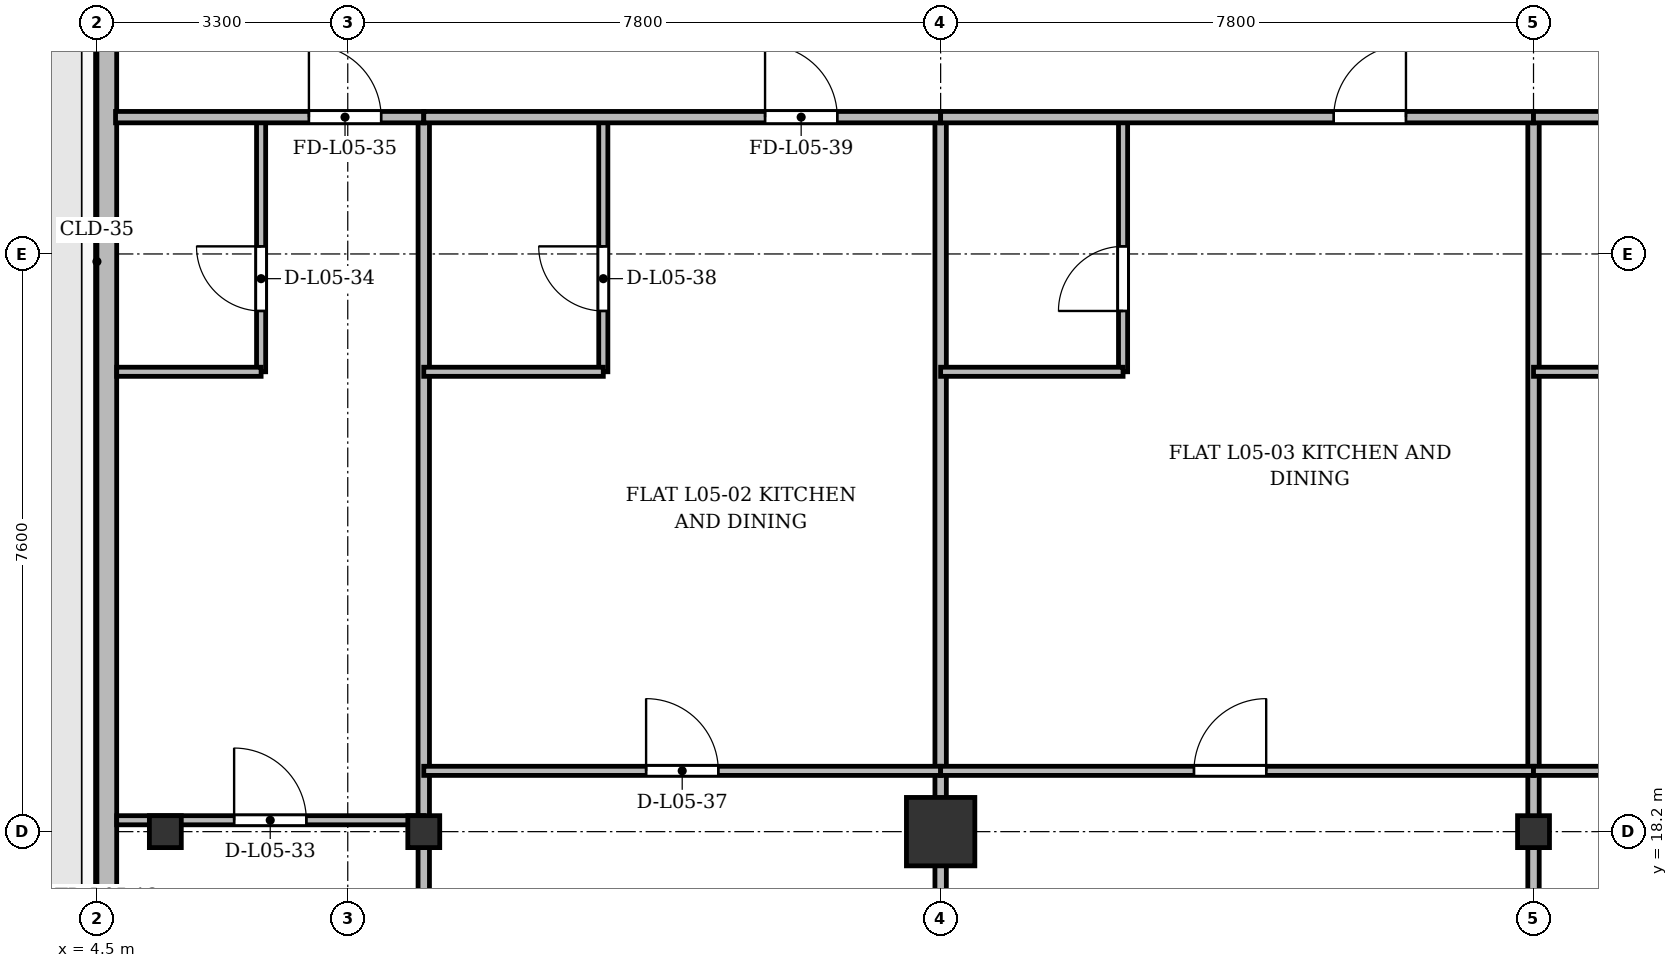
"""IFC4 building model, lengths in metres.
Left out: names, types, materials, properties, quantities, classifications, styles, units other than length and angle.
Written with IfcOpenShell. Run it as: python <this file> out.ifc"""

import sys

from ifc_helpers import new_model, si_unit, direction, frame, frame_2d, origin, origin_2d, place, context, subcontext, project, spatial, rectangle, i_section, extrude, source, transform, mapped, element, fill, save


model = new_model("IFC4")
c1 = context("Model", 3, precision=1e-05, world=origin(), true_north=direction((0.0, 1.0)))
c2 = subcontext(c1, "Body", "Model", "MODEL_VIEW")
j1 = project(units=[si_unit("LENGTHUNIT", "METRE"), si_unit("PLANEANGLEUNIT", "RADIAN")], contexts=[c1])
p1 = place(None, origin())
s1 = spatial("IfcSite", under=j1, at=p1, CompositionType="ELEMENT")
p2 = place(p1, origin())
s2 = spatial("IfcBuilding", under=s1, at=p2, CompositionType="ELEMENT")
p3 = place(p2, frame((0.0, 0.0, 23.5)))
s3 = spatial("IfcBuildingStorey", under=s2, at=p3, CompositionType="ELEMENT", Elevation=23.5)
m1 = source(origin(), c2, "Body", "SweptSolid", [
    extrude(i_section(OverallWidth=0.42, OverallDepth=0.42, WebThickness=0.026, FlangeThickness=0.04, at=origin_2d()), origin(), (0.0, 0.0, 1.0), 3.6),
])
for number, where, z_axis, x_axis in (
    (1, (5.4, 18.2, 0.0), (0.0, 0.0, 1.0), (1.0, 0.0, 0.0)),
    (2, (8.8, 18.2, 0.0), (0.0, 0.0, 1.0), (1.0, 0.0, 0.0)),
):
    element("IfcColumn", number, at=place(p3, frame(where, z_axis=z_axis, x_axis=x_axis)), inside=s3, PredefinedType="COLUMN", context=c2, shape_type="MappedRepresentation", body=[
        mapped(m1, transform((0.0, 0.0, 0.0), x_axis=(1.0, 0.0, 0.0), y_axis=(0.0, 1.0, 0.0), z_axis=(0.0, 0.0, 1.0), scale=1.0)),
    ])
m2 = source(origin(), c2, "Body", "SweptSolid", [
    extrude(rectangle(XDim=0.9, YDim=0.9, at=origin_2d()), origin(), (0.0, 0.0, 1.0), 3.6),
])
p4 = place(p3, frame((15.6, 18.2, 0.0), z_axis=(0.0, 0.0, 1.0), x_axis=(1.0, 0.0, 0.0)))
e3 = element("IfcColumn", 3, at=p4, inside=s3, PredefinedType="COLUMN", context=c2, shape_type="MappedRepresentation", body=[
    mapped(m2, transform((0.0, 0.0, 0.0), x_axis=(1.0, 0.0, 0.0), y_axis=(0.0, 1.0, 0.0), z_axis=(0.0, 0.0, 1.0), scale=1.0)),
])
p5 = place(p3, frame((23.4, 18.2, 0.0), z_axis=(0.0, 0.0, 1.0), x_axis=(1.0, 0.0, 0.0)))
e4 = element("IfcColumn", 4, at=p5, inside=s3, PredefinedType="COLUMN", context=c2, shape_type="MappedRepresentation", body=[
    mapped(m1, transform((0.0, 0.0, 0.0), x_axis=(1.0, 0.0, 0.0), y_axis=(0.0, 1.0, 0.0), z_axis=(0.0, 0.0, 1.0), scale=1.0)),
])
p6 = place(p3, frame((4.63, 5.9, 0.0), z_axis=(0.0, 0.0, 1.0), x_axis=(0.0, 1.0, 0.0)))
e5 = element("IfcWall", 5, at=p6, inside=s3, PredefinedType="SOLIDWALL", context=c2, shape_type="SweptSolid", body=[
    extrude(rectangle(XDim=39.6, YDim=0.26, at=frame_2d((19.8, 0.0))), origin(), (0.0, 0.0, 1.0), 3.34),
])
p7 = place(p6, frame((9.745, 0.0, 0.0)))
e6 = element("IfcOpeningElement", 6, at=p7, cuts=e5, PredefinedType="OPENING", context=c2, shape_type="SweptSolid", body=[
    extrude(rectangle(XDim=1.2, YDim=2.2, at=frame_2d((0.6, 1.1))), frame((0.0, 0.14, 0.0), z_axis=(0.0, -1.0, 0.0), x_axis=(1.0, 0.0, 0.0)), (0.0, 0.0, 1.0), 0.28),
])
p8 = place(p6, frame((1.45, 0.0, 0.92)))
e7 = element("IfcOpeningElement", 7, at=p8, cuts=e5, PredefinedType="OPENING", context=c2, shape_type="SweptSolid", body=[
    extrude(rectangle(XDim=1.2, YDim=1.65, at=frame_2d((0.6, 0.825))), frame((0.0, 0.14, 0.0), z_axis=(0.0, -1.0, 0.0), x_axis=(1.0, 0.0, 0.0)), (0.0, 0.0, 1.0), 0.28),
])
p9 = place(p6, frame((4.3, 0.0, 0.92)))
e8 = element("IfcOpeningElement", 8, at=p9, cuts=e5, PredefinedType="OPENING", context=c2, shape_type="SweptSolid", body=[
    extrude(rectangle(XDim=2.4, YDim=2.1, at=frame_2d((1.2, 1.05))), frame((0.0, 0.14, 0.0), z_axis=(0.0, -1.0, 0.0), x_axis=(1.0, 0.0, 0.0)), (0.0, 0.0, 1.0), 0.28),
])
p10 = place(p6, frame((33.9, 0.0, 0.92)))
e9 = element("IfcOpeningElement", 9, at=p10, cuts=e5, PredefinedType="OPENING", context=c2, shape_type="SweptSolid", body=[
    extrude(rectangle(XDim=1.2, YDim=1.65, at=frame_2d((0.6, 0.825))), frame((0.0, 0.14, 0.0), z_axis=(0.0, -1.0, 0.0), x_axis=(1.0, 0.0, 0.0)), (0.0, 0.0, 1.0), 0.28),
])
p11 = place(p6, frame((37.25, 0.0, 0.92)))
e10 = element("IfcOpeningElement", 10, at=p11, cuts=e5, PredefinedType="OPENING", context=c2, shape_type="SweptSolid", body=[
    extrude(rectangle(XDim=1.2, YDim=1.65, at=frame_2d((0.6, 0.825))), frame((0.0, 0.14, 0.0), z_axis=(0.0, -1.0, 0.0), x_axis=(1.0, 0.0, 0.0)), (0.0, 0.0, 1.0), 0.28),
])
for number, where, z_axis, x_axis in (
    (11, (8.8, 3.145, 0.0), (0.0, 0.0, 1.0), (0.0, 1.0, 0.0)),
    (12, (15.6, 3.145, 0.0), (0.0, 0.0, 1.0), (0.0, 1.0, 0.0)),
    (13, (23.4, 3.145, 0.0), (0.0, 0.0, 1.0), (0.0, 1.0, 0.0)),
):
    element("IfcWall", number, at=place(p3, frame(where, z_axis=z_axis, x_axis=x_axis)), inside=s3, PredefinedType="PARTITIONING", context=c2, shape_type="SweptSolid", body=[
        extrude(rectangle(XDim=24.455, YDim=0.15, at=frame_2d((12.228, 0.0))), origin(), (0.0, 0.0, 1.0), 2.752),
    ])
p12 = place(p3, frame((4.76, 18.35, 0.0), z_axis=(0.0, 0.0, 1.0), x_axis=(1.0, 0.0, 0.0)))
e14 = element("IfcWall", 14, at=p12, inside=s3, PredefinedType="PARTITIONING", context=c2, shape_type="SweptSolid", body=[
    extrude(rectangle(XDim=4.04, YDim=0.12, at=frame_2d((2.02, 0.0))), origin(), (0.0, 0.0, 1.0), 2.69),
])
p13 = place(p12, frame((1.545, 0.0, 0.0)))
e15 = element("IfcOpeningElement", 15, at=p13, cuts=e14, PredefinedType="OPENING", context=c2, shape_type="SweptSolid", body=[
    extrude(rectangle(XDim=0.95, YDim=2.15, at=frame_2d((0.475, 1.075))), frame((0.0, 0.07, 0.0), z_axis=(0.0, -1.0, 0.0), x_axis=(1.0, 0.0, 0.0)), (0.0, 0.0, 1.0), 0.14),
])
p14 = place(p3, frame((6.66, 24.25, 0.0), z_axis=(0.0, 0.0, 1.0), x_axis=(0.0, 1.0, 0.0)))
e16 = element("IfcWall", 16, at=p14, inside=s3, PredefinedType="PARTITIONING", context=c2, shape_type="SweptSolid", body=[
    extrude(rectangle(XDim=3.35, YDim=0.12, at=frame_2d((1.675, 0.0))), origin(), (0.0, 0.0, 1.0), 2.94),
])
p15 = place(p14, frame((0.8, 0.0, 0.0)))
e17 = element("IfcOpeningElement", 17, at=p15, cuts=e16, PredefinedType="OPENING", context=c2, shape_type="SweptSolid", body=[
    extrude(rectangle(XDim=0.85, YDim=2.1, at=frame_2d((0.425, 1.05))), frame((0.0, 0.07, 0.0), z_axis=(0.0, -1.0, 0.0), x_axis=(1.0, 0.0, 0.0)), (0.0, 0.0, 1.0), 0.14),
])
p16 = place(p3, frame((4.76, 24.25, 0.0), z_axis=(0.0, 0.0, 1.0), x_axis=(1.0, 0.0, 0.0)))
e18 = element("IfcWall", 18, at=p16, inside=s3, PredefinedType="PARTITIONING", context=c2, shape_type="SweptSolid", body=[
    extrude(rectangle(XDim=1.9, YDim=0.12, at=frame_2d((0.95, 0.0))), origin(), (0.0, 0.0, 1.0), 2.752),
])
p17 = place(p3, frame((4.745, 27.6, 0.0), z_axis=(0.0, 0.0, 1.0), x_axis=(1.0, 0.0, 0.0)))
e19 = element("IfcWall", 19, at=p17, inside=s3, PredefinedType="PARTITIONING", context=c2, shape_type="SweptSolid", body=[
    extrude(rectangle(XDim=4.055, YDim=0.15, at=frame_2d((2.027, 0.0))), origin(), (0.0, 0.0, 1.0), 2.752),
])
p18 = place(p17, frame((2.544, 0.0, 0.0)))
e20 = element("IfcOpeningElement", 20, at=p18, cuts=e19, PredefinedType="OPENING", context=c2, shape_type="SweptSolid", body=[
    extrude(rectangle(XDim=0.95, YDim=2.15, at=frame_2d((0.475, 1.075))), frame((0.0, 0.085, 0.0), z_axis=(0.0, -1.0, 0.0), x_axis=(1.0, 0.0, 0.0)), (0.0, 0.0, 1.0), 0.17),
])
p19 = place(p3, frame((8.8, 19.0, 0.0), z_axis=(0.0, 0.0, 1.0), x_axis=(1.0, 0.0, 0.0)))
e21 = element("IfcWall", 21, at=p19, inside=s3, PredefinedType="PARTITIONING", context=c2, shape_type="SweptSolid", body=[
    extrude(rectangle(XDim=6.8, YDim=0.12, at=frame_2d((3.4, 0.0))), origin(), (0.0, 0.0, 1.0), 2.752),
])
p20 = place(p19, frame((2.925, 0.0, 0.0)))
e22 = element("IfcOpeningElement", 22, at=p20, cuts=e21, PredefinedType="OPENING", context=c2, shape_type="SweptSolid", body=[
    extrude(rectangle(XDim=0.95, YDim=2.15, at=frame_2d((0.475, 1.075))), frame((0.0, 0.07, 0.0), z_axis=(0.0, -1.0, 0.0), x_axis=(1.0, 0.0, 0.0)), (0.0, 0.0, 1.0), 0.14),
])
p21 = place(p3, frame((11.162, 24.25, 0.0), z_axis=(0.0, 0.0, 1.0), x_axis=(0.0, 1.0, 0.0)))
e23 = element("IfcWall", 23, at=p21, inside=s3, PredefinedType="PARTITIONING", context=c2, shape_type="SweptSolid", body=[
    extrude(rectangle(XDim=3.35, YDim=0.12, at=frame_2d((1.675, 0.0))), origin(), (0.0, 0.0, 1.0), 2.94),
])
p22 = place(p21, frame((0.8, 0.0, 0.0)))
e24 = element("IfcOpeningElement", 24, at=p22, cuts=e23, PredefinedType="OPENING", context=c2, shape_type="SweptSolid", body=[
    extrude(rectangle(XDim=0.85, YDim=2.1, at=frame_2d((0.425, 1.05))), frame((0.0, 0.07, 0.0), z_axis=(0.0, -1.0, 0.0), x_axis=(1.0, 0.0, 0.0)), (0.0, 0.0, 1.0), 0.14),
])
p23 = place(p3, frame((8.8, 24.25, 0.0), z_axis=(0.0, 0.0, 1.0), x_axis=(1.0, 0.0, 0.0)))
e25 = element("IfcWall", 25, at=p23, inside=s3, PredefinedType="PARTITIONING", context=c2, shape_type="SweptSolid", body=[
    extrude(rectangle(XDim=2.362, YDim=0.12, at=frame_2d((1.181, 0.0))), origin(), (0.0, 0.0, 1.0), 2.752),
])
p24 = place(p3, frame((8.8, 27.6, 0.0), z_axis=(0.0, 0.0, 1.0), x_axis=(1.0, 0.0, 0.0)))
e26 = element("IfcWall", 26, at=p24, inside=s3, PredefinedType="PARTITIONING", context=c2, shape_type="SweptSolid", body=[
    extrude(rectangle(XDim=6.8, YDim=0.15, at=frame_2d((3.4, 0.0))), origin(), (0.0, 0.0, 1.0), 2.752),
])
p25 = place(p24, frame((4.49, 0.0, 0.0)))
e27 = element("IfcOpeningElement", 27, at=p25, cuts=e26, PredefinedType="OPENING", context=c2, shape_type="SweptSolid", body=[
    extrude(rectangle(XDim=0.95, YDim=2.15, at=frame_2d((0.475, 1.075))), frame((0.0, 0.085, 0.0), z_axis=(0.0, -1.0, 0.0), x_axis=(1.0, 0.0, 0.0)), (0.0, 0.0, 1.0), 0.17),
])
p26 = place(p3, frame((15.6, 19.0, 0.0), z_axis=(0.0, 0.0, 1.0), x_axis=(1.0, 0.0, 0.0)))
e28 = element("IfcWall", 28, at=p26, inside=s3, PredefinedType="PARTITIONING", context=c2, shape_type="SweptSolid", body=[
    extrude(rectangle(XDim=7.8, YDim=0.12, at=frame_2d((3.9, 0.0))), origin(), (0.0, 0.0, 1.0), 2.752),
])
p27 = place(p26, frame((3.333, 0.0, 0.0)))
e29 = element("IfcOpeningElement", 29, at=p27, cuts=e28, PredefinedType="OPENING", context=c2, shape_type="SweptSolid", body=[
    extrude(rectangle(XDim=0.95, YDim=2.15, at=frame_2d((0.475, 1.075))), frame((0.0, 0.07, 0.0), z_axis=(0.0, -1.0, 0.0), x_axis=(1.0, 0.0, 0.0)), (0.0, 0.0, 1.0), 0.14),
])
p28 = place(p3, frame((18.0, 24.25, 0.0), z_axis=(0.0, 0.0, 1.0), x_axis=(0.0, 1.0, 0.0)))
e30 = element("IfcWall", 30, at=p28, inside=s3, PredefinedType="PARTITIONING", context=c2, shape_type="SweptSolid", body=[
    extrude(rectangle(XDim=3.35, YDim=0.12, at=frame_2d((1.675, 0.0))), origin(), (0.0, 0.0, 1.0), 2.94),
])
p29 = place(p28, frame((0.8, 0.0, 0.0)))
e31 = element("IfcOpeningElement", 31, at=p29, cuts=e30, PredefinedType="OPENING", context=c2, shape_type="SweptSolid", body=[
    extrude(rectangle(XDim=0.85, YDim=2.1, at=frame_2d((0.425, 1.05))), frame((0.0, 0.07, 0.0), z_axis=(0.0, -1.0, 0.0), x_axis=(1.0, 0.0, 0.0)), (0.0, 0.0, 1.0), 0.14),
])
p30 = place(p3, frame((15.6, 24.25, 0.0), z_axis=(0.0, 0.0, 1.0), x_axis=(1.0, 0.0, 0.0)))
e32 = element("IfcWall", 32, at=p30, inside=s3, PredefinedType="PARTITIONING", context=c2, shape_type="SweptSolid", body=[
    extrude(rectangle(XDim=2.4, YDim=0.12, at=frame_2d((1.2, 0.0))), origin(), (0.0, 0.0, 1.0), 2.752),
])
p31 = place(p3, frame((15.6, 27.6, 0.0), z_axis=(0.0, 0.0, 1.0), x_axis=(1.0, 0.0, 0.0)))
e33 = element("IfcWall", 33, at=p31, inside=s3, PredefinedType="PARTITIONING", context=c2, shape_type="SweptSolid", body=[
    extrude(rectangle(XDim=7.8, YDim=0.15, at=frame_2d((3.9, 0.0))), origin(), (0.0, 0.0, 1.0), 2.752),
])
p32 = place(p31, frame((5.172, 0.0, 0.0)))
e34 = element("IfcOpeningElement", 34, at=p32, cuts=e33, PredefinedType="OPENING", context=c2, shape_type="SweptSolid", body=[
    extrude(rectangle(XDim=0.95, YDim=2.15, at=frame_2d((0.475, 1.075))), frame((0.0, 0.085, 0.0), z_axis=(0.0, -1.0, 0.0), x_axis=(1.0, 0.0, 0.0)), (0.0, 0.0, 1.0), 0.17),
])
p33 = place(p3, frame((23.4, 19.0, 0.0), z_axis=(0.0, 0.0, 1.0), x_axis=(1.0, 0.0, 0.0)))
e35 = element("IfcWall", 35, at=p33, inside=s3, PredefinedType="PARTITIONING", context=c2, shape_type="SweptSolid", body=[
    extrude(rectangle(XDim=7.2, YDim=0.12, at=frame_2d((3.6, 0.0))), origin(), (0.0, 0.0, 1.0), 2.752),
])
p34 = place(p33, frame((3.125, 0.0, 0.0)))
e36 = element("IfcOpeningElement", 36, at=p34, cuts=e35, PredefinedType="OPENING", context=c2, shape_type="SweptSolid", body=[
    extrude(rectangle(XDim=0.95, YDim=2.15, at=frame_2d((0.475, 1.075))), frame((0.0, 0.07, 0.0), z_axis=(0.0, -1.0, 0.0), x_axis=(1.0, 0.0, 0.0)), (0.0, 0.0, 1.0), 0.14),
])
p35 = place(p3, frame((23.4, 24.25, 0.0), z_axis=(0.0, 0.0, 1.0), x_axis=(1.0, 0.0, 0.0)))
e37 = element("IfcWall", 37, at=p35, inside=s3, PredefinedType="PARTITIONING", context=c2, shape_type="SweptSolid", body=[
    extrude(rectangle(XDim=2.4, YDim=0.12, at=frame_2d((1.2, 0.0))), origin(), (0.0, 0.0, 1.0), 2.752),
])
p36 = place(p3, frame((23.4, 27.6, 0.0), z_axis=(0.0, 0.0, 1.0), x_axis=(1.0, 0.0, 0.0)))
e38 = element("IfcWall", 38, at=p36, inside=s3, PredefinedType="PARTITIONING", context=c2, shape_type="SweptSolid", body=[
    extrude(rectangle(XDim=7.2, YDim=0.15, at=frame_2d((3.6, 0.0))), origin(), (0.0, 0.0, 1.0), 2.752),
])
p37 = place(p36, frame((4.706, 0.0, 0.0)))
e39 = element("IfcOpeningElement", 39, at=p37, cuts=e38, PredefinedType="OPENING", context=c2, shape_type="SweptSolid", body=[
    extrude(rectangle(XDim=0.95, YDim=2.15, at=frame_2d((0.475, 1.075))), frame((0.0, 0.085, 0.0), z_axis=(0.0, -1.0, 0.0), x_axis=(1.0, 0.0, 0.0)), (0.0, 0.0, 1.0), 0.17),
])
m3 = source(origin(), c2, "Body", "SweptSolid", [
    extrude(rectangle(XDim=0.95, YDim=2.15, at=frame_2d((0.475, 1.075))), frame((0.0, 0.025, 0.0), z_axis=(0.0, -1.0, 0.0), x_axis=(1.0, 0.0, 0.0)), (0.0, 0.0, 1.0), 0.05),
])
p38 = place(p13, origin())
e40 = element("IfcDoor", 40, at=p38, inside=s3, OperationType="SINGLE_SWING_LEFT", PredefinedType="DOOR", context=c2, shape_type="MappedRepresentation", body=[
    mapped(m3, transform((0.0, 0.0, 0.0), x_axis=(1.0, 0.0, 0.0), y_axis=(0.0, 1.0, 0.0), z_axis=(0.0, 0.0, 1.0), scale=1.0)),
])
fill(e15, e40)
m4 = source(origin(), c2, "Body", "SweptSolid", [
    extrude(rectangle(XDim=0.85, YDim=2.1, at=frame_2d((0.425, 1.05))), frame((0.0, 0.025, 0.0), z_axis=(0.0, -1.0, 0.0), x_axis=(1.0, 0.0, 0.0)), (0.0, 0.0, 1.0), 0.05),
])
p39 = place(p15, origin())
e41 = element("IfcDoor", 41, at=p39, inside=s3, OperationType="SINGLE_SWING_RIGHT", PredefinedType="DOOR", context=c2, shape_type="MappedRepresentation", body=[
    mapped(m4, transform((0.0, 0.0, 0.0), x_axis=(1.0, 0.0, 0.0), y_axis=(0.0, 1.0, 0.0), z_axis=(0.0, 0.0, 1.0), scale=1.0)),
])
fill(e17, e41)
p40 = place(p18, origin())
e42 = element("IfcDoor", 42, at=p40, inside=s3, OperationType="SINGLE_SWING_LEFT", PredefinedType="DOOR", context=c2, shape_type="MappedRepresentation", body=[
    mapped(m3, transform((0.0, 0.0, 0.0), x_axis=(1.0, 0.0, 0.0), y_axis=(0.0, 1.0, 0.0), z_axis=(0.0, 0.0, 1.0), scale=1.0)),
])
fill(e20, e42)
p41 = place(p20, origin())
e43 = element("IfcDoor", 43, at=p41, inside=s3, OperationType="SINGLE_SWING_LEFT", PredefinedType="DOOR", context=c2, shape_type="MappedRepresentation", body=[
    mapped(m3, transform((0.0, 0.0, 0.0), x_axis=(1.0, 0.0, 0.0), y_axis=(0.0, 1.0, 0.0), z_axis=(0.0, 0.0, 1.0), scale=1.0)),
])
fill(e22, e43)
p42 = place(p22, origin())
e44 = element("IfcDoor", 44, at=p42, inside=s3, OperationType="SINGLE_SWING_RIGHT", PredefinedType="DOOR", context=c2, shape_type="MappedRepresentation", body=[
    mapped(m4, transform((0.0, 0.0, 0.0), x_axis=(1.0, 0.0, 0.0), y_axis=(0.0, 1.0, 0.0), z_axis=(0.0, 0.0, 1.0), scale=1.0)),
])
fill(e24, e44)
p43 = place(p25, origin())
e45 = element("IfcDoor", 45, at=p43, inside=s3, OperationType="SINGLE_SWING_LEFT", PredefinedType="DOOR", context=c2, shape_type="MappedRepresentation", body=[
    mapped(m3, transform((0.0, 0.0, 0.0), x_axis=(1.0, 0.0, 0.0), y_axis=(0.0, 1.0, 0.0), z_axis=(0.0, 0.0, 1.0), scale=1.0)),
])
fill(e27, e45)
p44 = place(p27, origin())
e46 = element("IfcDoor", 46, at=p44, inside=s3, OperationType="SINGLE_SWING_RIGHT", PredefinedType="DOOR", context=c2, shape_type="MappedRepresentation", body=[
    mapped(m3, transform((0.0, 0.0, 0.0), x_axis=(1.0, 0.0, 0.0), y_axis=(0.0, 1.0, 0.0), z_axis=(0.0, 0.0, 1.0), scale=1.0)),
])
fill(e29, e46)
p45 = place(p29, origin())
e47 = element("IfcDoor", 47, at=p45, inside=s3, OperationType="SINGLE_SWING_LEFT", PredefinedType="DOOR", context=c2, shape_type="MappedRepresentation", body=[
    mapped(m4, transform((0.0, 0.0, 0.0), x_axis=(1.0, 0.0, 0.0), y_axis=(0.0, 1.0, 0.0), z_axis=(0.0, 0.0, 1.0), scale=1.0)),
])
fill(e31, e47)
p46 = place(p32, origin())
e48 = element("IfcDoor", 48, at=p46, inside=s3, OperationType="SINGLE_SWING_RIGHT", PredefinedType="DOOR", context=c2, shape_type="MappedRepresentation", body=[
    mapped(m3, transform((0.0, 0.0, 0.0), x_axis=(1.0, 0.0, 0.0), y_axis=(0.0, 1.0, 0.0), z_axis=(0.0, 0.0, 1.0), scale=1.0)),
])
fill(e34, e48)
save(model, sys.argv[1])
